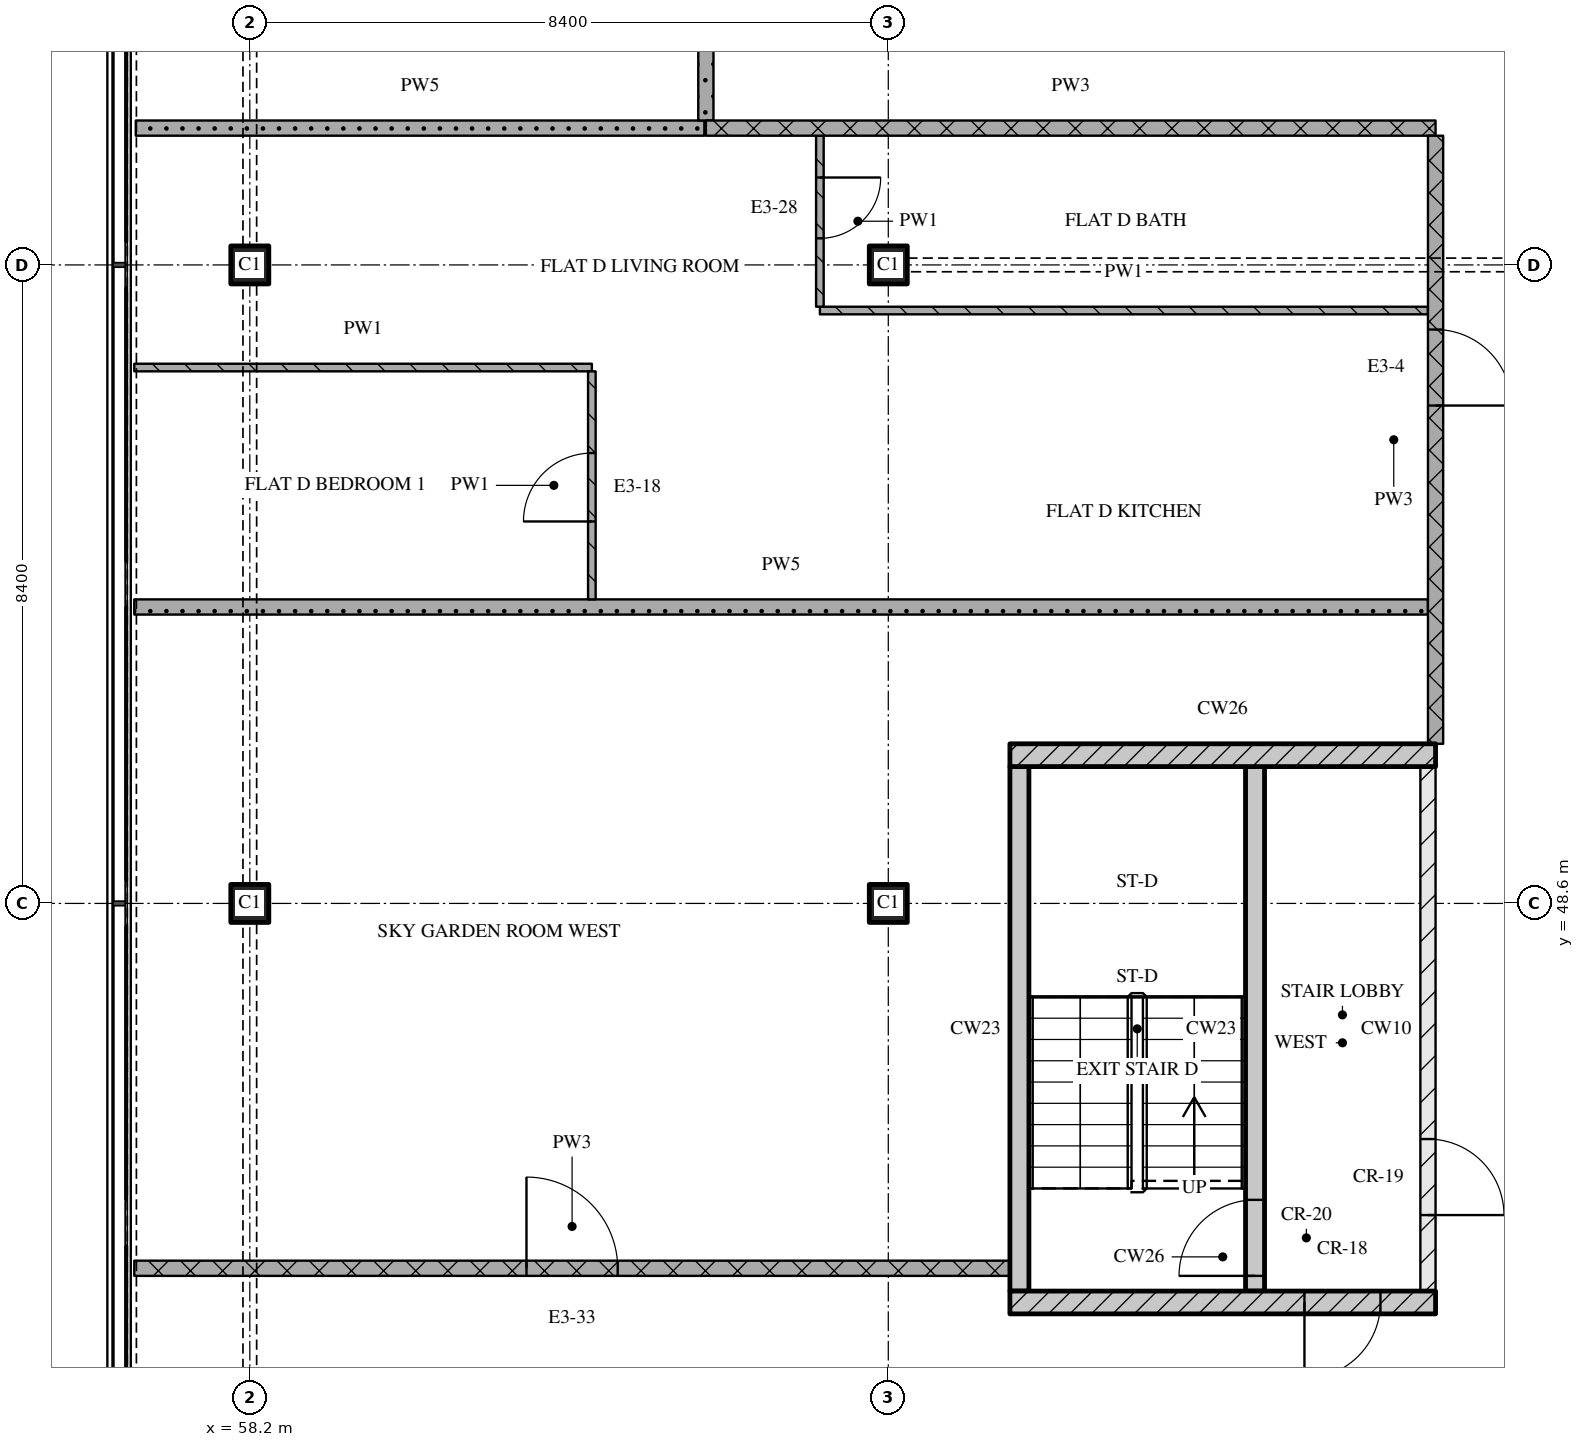
"""IFC4 building model, lengths in metres.
Left out: names, types, materials, properties, quantities, classifications, styles, units other than length and angle.
Written with IfcOpenShell. Run it as: python <this file> out.ifc"""

import sys

from ifc_helpers import new_model, si_unit, direction, frame, frame_2d, origin, origin_2d, place, context, subcontext, project, spatial, rectangle, extrude, element, fill, save


model = new_model("IFC4")
c1 = context("Model", 3, precision=1e-05, world=origin(), true_north=direction((0.0, 1.0)))
c2 = subcontext(c1, "Body", "Model", "MODEL_VIEW")
j1 = project(units=[si_unit("LENGTHUNIT", "METRE"), si_unit("PLANEANGLEUNIT", "RADIAN")], contexts=[c1])
p1 = place(None, origin())
s1 = spatial("IfcSite", under=j1, at=p1, CompositionType="ELEMENT")
p2 = place(p1, origin())
s2 = spatial("IfcBuilding", under=s1, at=p2, CompositionType="ELEMENT")
p3 = place(p2, frame((0.0, 0.0, 281.55)))
s3 = spatial("IfcBuildingStorey", under=s2, at=p3, CompositionType="ELEMENT", Elevation=281.55)
for number, where, z_axis, x_axis in (
    (1, (58.2, 48.6, 0.0), (0.0, 0.0, 1.0), (1.0, 0.0, 0.0)),
    (2, (58.2, 57.0, 0.0), (0.0, 0.0, 1.0), (1.0, 0.0, 0.0)),
    (3, (66.6, 48.6, 0.0), (0.0, 0.0, 1.0), (1.0, 0.0, 0.0)),
    (4, (66.6, 57.0, 0.0), (0.0, 0.0, 1.0), (1.0, 0.0, 0.0)),
):
    element("IfcColumn", number, at=place(p3, frame(where, z_axis=z_axis, x_axis=x_axis)), inside=s3, PredefinedType="COLUMN", context=c2, shape_type="SweptSolid", body=[
        extrude(rectangle(XDim=0.5, YDim=0.5, at=origin_2d()), origin(), (0.0, 0.0, 1.0), 3.6),
    ])
p4 = place(p3, frame((68.2, 43.35, 0.0), z_axis=(0.0, 0.0, 1.0), x_axis=(1.0, 0.0, 0.0)))
e5 = element("IfcWall", 5, at=p4, inside=s3, PredefinedType="SOLIDWALL", context=c2, shape_type="SweptSolid", body=[
    extrude(rectangle(XDim=5.6, YDim=0.3, at=frame_2d((2.8, 0.0))), origin(), (0.0, 0.0, 1.0), 3.32),
])
p5 = place(p4, frame((3.875, 0.0, 0.0)))
e6 = element("IfcOpeningElement", 6, at=p5, cuts=e5, PredefinedType="OPENING", context=c2, shape_type="SweptSolid", body=[
    extrude(rectangle(XDim=1.0, YDim=2.1, at=frame_2d((0.5, 1.05))), frame((0.0, 0.16, 0.0), z_axis=(0.0, -1.0, 0.0), x_axis=(1.0, 0.0, 0.0)), (0.0, 0.0, 1.0), 0.32),
])
p6 = place(p3, frame((68.325, 43.5, 0.0), z_axis=(0.0, 0.0, 1.0), x_axis=(0.0, 1.0, 0.0)))
e7 = element("IfcWall", 7, at=p6, inside=s3, PredefinedType="SOLIDWALL", context=c2, shape_type="SweptSolid", body=[
    extrude(rectangle(XDim=6.9, YDim=0.25, at=frame_2d((3.45, 0.0))), origin(), (0.0, 0.0, 1.0), 3.32),
])
p7 = place(p3, frame((71.425, 43.5, 0.0), z_axis=(0.0, 0.0, 1.0), x_axis=(0.0, 1.0, 0.0)))
e8 = element("IfcWall", 8, at=p7, inside=s3, PredefinedType="SOLIDWALL", context=c2, shape_type="SweptSolid", body=[
    extrude(rectangle(XDim=6.9, YDim=0.25, at=frame_2d((3.45, 0.0))), origin(), (0.0, 0.0, 1.0), 3.32),
])
p8 = place(p7, frame((0.2, 0.0, 0.0)))
e9 = element("IfcOpeningElement", 9, at=p8, cuts=e8, PredefinedType="OPENING", context=c2, shape_type="SweptSolid", body=[
    extrude(rectangle(XDim=1.0, YDim=2.1, at=frame_2d((0.5, 1.05))), frame((0.0, 0.135, 0.0), z_axis=(0.0, -1.0, 0.0), x_axis=(1.0, 0.0, 0.0)), (0.0, 0.0, 1.0), 0.27),
])
p9 = place(p3, frame((73.7, 43.5, 0.0), z_axis=(0.0, 0.0, 1.0), x_axis=(0.0, 1.0, 0.0)))
e10 = element("IfcWall", 10, at=p9, inside=s3, PredefinedType="PARTITIONING", context=c2, shape_type="SweptSolid", body=[
    extrude(rectangle(XDim=6.9, YDim=0.2, at=frame_2d((3.45, 0.0))), origin(), (0.0, 0.0, 1.0), 3.32),
])
p10 = place(p9, frame((1.0, 0.0, 0.0)))
e11 = element("IfcOpeningElement", 11, at=p10, cuts=e10, PredefinedType="OPENING", context=c2, shape_type="SweptSolid", body=[
    extrude(rectangle(XDim=1.0, YDim=2.1, at=frame_2d((0.5, 1.05))), frame((0.0, 0.11, 0.0), z_axis=(0.0, -1.0, 0.0), x_axis=(1.0, 0.0, 0.0)), (0.0, 0.0, 1.0), 0.22),
])
p11 = place(p3, frame((68.2, 50.55, 0.0), z_axis=(0.0, 0.0, 1.0), x_axis=(1.0, 0.0, 0.0)))
e12 = element("IfcWall", 12, at=p11, inside=s3, PredefinedType="SOLIDWALL", context=c2, shape_type="SweptSolid", body=[
    extrude(rectangle(XDim=5.6, YDim=0.3, at=frame_2d((2.8, 0.0))), origin(), (0.0, 0.0, 1.0), 3.32),
])
p12 = place(p3, frame((56.68, 43.8, 0.0), z_axis=(0.0, 0.0, 1.0), x_axis=(1.0, 0.0, 0.0)))
e13 = element("IfcWall", 13, at=p12, inside=s3, PredefinedType="PARTITIONING", context=c2, shape_type="SweptSolid", body=[
    extrude(rectangle(XDim=11.52, YDim=0.2, at=frame_2d((5.76, 0.0))), origin(), (0.0, 0.0, 1.0), 3.32),
])
p13 = place(p12, frame((5.16, 0.0, 0.0)))
e14 = element("IfcOpeningElement", 14, at=p13, cuts=e13, PredefinedType="OPENING", context=c2, shape_type="SweptSolid", body=[
    extrude(rectangle(XDim=1.2, YDim=2.1, at=frame_2d((0.6, 1.05))), frame((0.0, 0.11, 0.0), z_axis=(0.0, -1.0, 0.0), x_axis=(1.0, 0.0, 0.0)), (0.0, 0.0, 1.0), 0.22),
])
p14 = place(p3, frame((56.68, 52.5, 0.0), z_axis=(0.0, 0.0, 1.0), x_axis=(1.0, 0.0, 0.0)))
e15 = element("IfcWall", 15, at=p14, inside=s3, PredefinedType="PARTITIONING", context=c2, shape_type="SweptSolid", body=[
    extrude(rectangle(XDim=17.02, YDim=0.2, at=frame_2d((8.51, 0.0))), origin(), (0.0, 0.0, 1.0), 3.32),
])
p15 = place(p3, frame((56.68, 55.65, 0.0), z_axis=(0.0, 0.0, 1.0), x_axis=(1.0, 0.0, 0.0)))
e16 = element("IfcWall", 16, at=p15, inside=s3, PredefinedType="PARTITIONING", context=c2, shape_type="SweptSolid", body=[
    extrude(rectangle(XDim=6.02, YDim=0.1, at=frame_2d((3.01, 0.0))), origin(), (0.0, 0.0, 1.0), 3.32),
])
p16 = place(p3, frame((65.7, 56.4, 0.0), z_axis=(0.0, 0.0, 1.0), x_axis=(1.0, 0.0, 0.0)))
e17 = element("IfcWall", 17, at=p16, inside=s3, PredefinedType="PARTITIONING", context=c2, shape_type="SweptSolid", body=[
    extrude(rectangle(XDim=8.0, YDim=0.1, at=frame_2d((4.0, 0.0))), origin(), (0.0, 0.0, 1.0), 3.32),
])
p17 = place(p3, frame((64.2, 58.8, 0.0), z_axis=(0.0, 0.0, 1.0), x_axis=(1.0, 0.0, 0.0)))
e18 = element("IfcWall", 18, at=p17, inside=s3, PredefinedType="PARTITIONING", context=c2, shape_type="SweptSolid", body=[
    extrude(rectangle(XDim=9.6, YDim=0.2, at=frame_2d((4.8, 0.0))), origin(), (0.0, 0.0, 1.0), 3.32),
])
p18 = place(p3, frame((56.7, 58.8, 0.0), z_axis=(0.0, 0.0, 1.0), x_axis=(1.0, 0.0, 0.0)))
e19 = element("IfcWall", 19, at=p18, inside=s3, PredefinedType="PARTITIONING", context=c2, shape_type="SweptSolid", body=[
    extrude(rectangle(XDim=7.48, YDim=0.2, at=frame_2d((3.74, 0.0))), origin(), (0.0, 0.0, 1.0), 3.32),
])
p19 = place(p3, frame((62.7, 52.6, 0.0), z_axis=(0.0, 0.0, 1.0), x_axis=(0.0, 1.0, 0.0)))
e20 = element("IfcWall", 20, at=p19, inside=s3, PredefinedType="PARTITIONING", context=c2, shape_type="SweptSolid", body=[
    extrude(rectangle(XDim=3.0, YDim=0.1, at=frame_2d((1.5, 0.0))), origin(), (0.0, 0.0, 1.0), 3.32),
])
p20 = place(p19, frame((1.025, 0.0, 0.0)))
e21 = element("IfcOpeningElement", 21, at=p20, cuts=e20, PredefinedType="OPENING", context=c2, shape_type="SweptSolid", body=[
    extrude(rectangle(XDim=0.9, YDim=2.1, at=frame_2d((0.45, 1.05))), frame((0.0, 0.06, 0.0), z_axis=(0.0, -1.0, 0.0), x_axis=(1.0, 0.0, 0.0)), (0.0, 0.0, 1.0), 0.12),
])
p21 = place(p3, frame((64.2, 61.1, 0.0), z_axis=(0.0, 0.0, 1.0), x_axis=(0.0, -1.0, 0.0)))
e22 = element("IfcWall", 22, at=p21, inside=s3, PredefinedType="PARTITIONING", context=c2, shape_type="SweptSolid", body=[
    extrude(rectangle(XDim=2.2, YDim=0.2, at=frame_2d((1.1, 0.0))), origin(), (0.0, 0.0, 1.0), 3.32),
])
p22 = place(p3, frame((65.7, 58.7, 0.0), z_axis=(0.0, 0.0, 1.0), x_axis=(0.0, -1.0, 0.0)))
e23 = element("IfcWall", 23, at=p22, inside=s3, PredefinedType="PARTITIONING", context=c2, shape_type="SweptSolid", body=[
    extrude(rectangle(XDim=2.25, YDim=0.1, at=frame_2d((1.125, 0.0))), origin(), (0.0, 0.0, 1.0), 3.32),
])
p23 = place(p22, frame((0.55, 0.0, 0.0)))
e24 = element("IfcOpeningElement", 24, at=p23, cuts=e23, PredefinedType="OPENING", context=c2, shape_type="SweptSolid", body=[
    extrude(rectangle(XDim=0.8, YDim=2.1, at=frame_2d((0.4, 1.05))), frame((0.0, 0.06, 0.0), z_axis=(0.0, -1.0, 0.0), x_axis=(1.0, 0.0, 0.0)), (0.0, 0.0, 1.0), 0.12),
])
p24 = place(p3, frame((73.8, 50.7, 0.0), z_axis=(0.0, 0.0, 1.0), x_axis=(0.0, 1.0, 0.0)))
e25 = element("IfcWall", 25, at=p24, inside=s3, PredefinedType="PARTITIONING", context=c2, shape_type="SweptSolid", body=[
    extrude(rectangle(XDim=8.0, YDim=0.2, at=frame_2d((4.0, 0.0))), origin(), (0.0, 0.0, 1.0), 3.32),
])
p25 = place(p24, frame((4.45, 0.0, 0.0)))
e26 = element("IfcOpeningElement", 26, at=p25, cuts=e25, PredefinedType="OPENING", context=c2, shape_type="SweptSolid", body=[
    extrude(rectangle(XDim=1.0, YDim=2.1, at=frame_2d((0.5, 1.05))), frame((0.0, 0.11, 0.0), z_axis=(0.0, -1.0, 0.0), x_axis=(1.0, 0.0, 0.0)), (0.0, 0.0, 1.0), 0.22),
])
p26 = place(p5, origin())
e27 = element("IfcDoor", 27, at=p26, inside=s3, OperationType="SINGLE_SWING_RIGHT", PredefinedType="DOOR", context=c2, shape_type="SweptSolid", body=[
    extrude(rectangle(XDim=1.0, YDim=2.1, at=frame_2d((0.5, 1.05))), frame((0.0, 0.025, 0.0), z_axis=(0.0, -1.0, 0.0), x_axis=(1.0, 0.0, 0.0)), (0.0, 0.0, 1.0), 0.05),
])
fill(e6, e27)
p27 = place(p8, origin())
e28 = element("IfcDoor", 28, at=p27, inside=s3, OperationType="SINGLE_SWING_LEFT", PredefinedType="DOOR", context=c2, shape_type="SweptSolid", body=[
    extrude(rectangle(XDim=1.0, YDim=2.1, at=frame_2d((0.5, 1.05))), frame((0.0, 0.025, 0.0), z_axis=(0.0, -1.0, 0.0), x_axis=(1.0, 0.0, 0.0)), (0.0, 0.0, 1.0), 0.05),
])
fill(e9, e28)
p28 = place(p10, origin())
e29 = element("IfcDoor", 29, at=p28, inside=s3, OperationType="SINGLE_SWING_RIGHT", PredefinedType="DOOR", context=c2, shape_type="SweptSolid", body=[
    extrude(rectangle(XDim=1.0, YDim=2.1, at=frame_2d((0.5, 1.05))), frame((0.0, 0.025, 0.0), z_axis=(0.0, -1.0, 0.0), x_axis=(1.0, 0.0, 0.0)), (0.0, 0.0, 1.0), 0.05),
])
fill(e11, e29)
p29 = place(p13, origin())
e30 = element("IfcDoor", 30, at=p29, inside=s3, OperationType="SINGLE_SWING_LEFT", PredefinedType="DOOR", context=c2, shape_type="SweptSolid", body=[
    extrude(rectangle(XDim=1.2, YDim=2.1, at=frame_2d((0.6, 1.05))), frame((0.0, 0.025, 0.0), z_axis=(0.0, -1.0, 0.0), x_axis=(1.0, 0.0, 0.0)), (0.0, 0.0, 1.0), 0.05),
])
fill(e14, e30)
p30 = place(p20, origin())
e31 = element("IfcDoor", 31, at=p30, inside=s3, OperationType="SINGLE_SWING_LEFT", PredefinedType="DOOR", context=c2, shape_type="SweptSolid", body=[
    extrude(rectangle(XDim=0.9, YDim=2.1, at=frame_2d((0.45, 1.05))), frame((0.0, 0.025, 0.0), z_axis=(0.0, -1.0, 0.0), x_axis=(1.0, 0.0, 0.0)), (0.0, 0.0, 1.0), 0.05),
])
fill(e21, e31)
p31 = place(p23, origin())
e32 = element("IfcDoor", 32, at=p31, inside=s3, OperationType="SINGLE_SWING_LEFT", PredefinedType="DOOR", context=c2, shape_type="SweptSolid", body=[
    extrude(rectangle(XDim=0.8, YDim=2.1, at=frame_2d((0.4, 1.05))), frame((0.0, 0.025, 0.0), z_axis=(0.0, -1.0, 0.0), x_axis=(1.0, 0.0, 0.0)), (0.0, 0.0, 1.0), 0.05),
])
fill(e24, e32)
p32 = place(p25, origin())
e33 = element("IfcDoor", 33, at=p32, inside=s3, OperationType="SINGLE_SWING_RIGHT", PredefinedType="DOOR", context=c2, shape_type="SweptSolid", body=[
    extrude(rectangle(XDim=1.0, YDim=2.1, at=frame_2d((0.5, 1.05))), frame((0.0, 0.025, 0.0), z_axis=(0.0, -1.0, 0.0), x_axis=(1.0, 0.0, 0.0)), (0.0, 0.0, 1.0), 0.05),
])
fill(e26, e33)
save(model, sys.argv[1])
